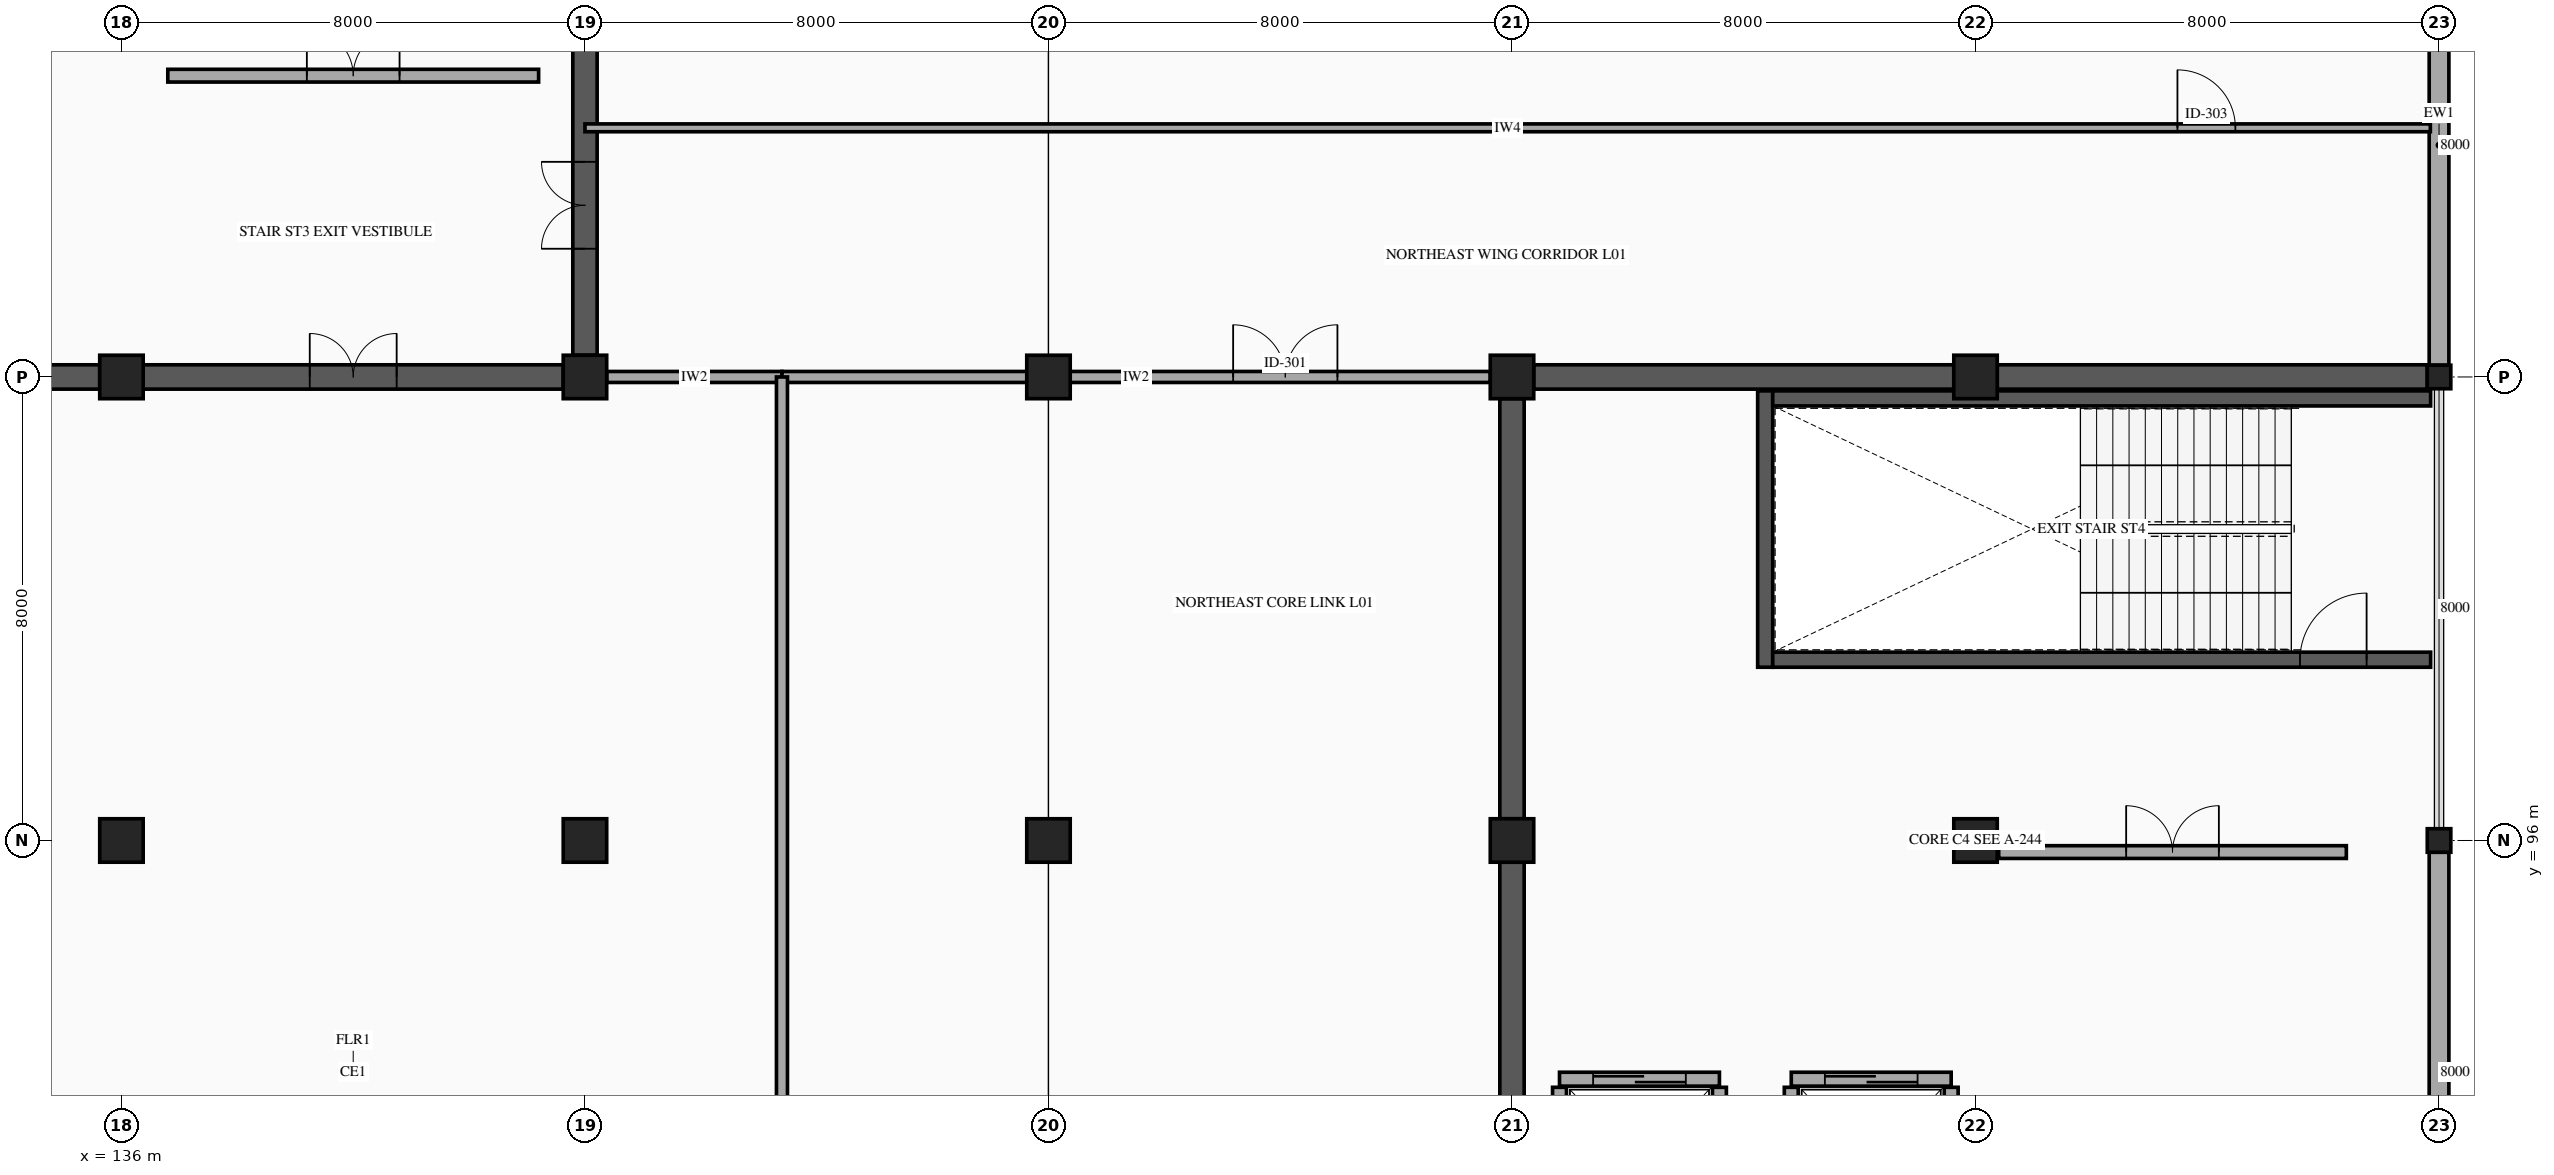
"""IFC4 building model, lengths in metres.
Left out: names, types, materials, properties, quantities, classifications, styles, units other than length and angle.
Written with IfcOpenShell. Run it as: python <this file> out.ifc"""

import sys

from ifc_helpers import new_model, si_unit, direction, frame, frame_2d, origin, origin_2d, place, context, subcontext, project, spatial, rectangle, hollow_rectangle, extrude, element, fill, save


model = new_model("IFC4")
c1 = context("Model", 3, precision=1e-05, world=origin(), true_north=direction((0.0, 1.0)))
c2 = subcontext(c1, "Body", "Model", "MODEL_VIEW")
j1 = project(units=[si_unit("LENGTHUNIT", "METRE"), si_unit("PLANEANGLEUNIT", "RADIAN")], contexts=[c1])
p1 = place(None, origin())
s1 = spatial("IfcSite", under=j1, at=p1, CompositionType="ELEMENT")
p2 = place(p1, origin())
s2 = spatial("IfcBuilding", under=s1, at=p2, CompositionType="ELEMENT")
p3 = place(p2, frame((0.0, 0.0, 5.6)))
s3 = spatial("IfcBuildingStorey", under=s2, at=p3, CompositionType="ELEMENT", Elevation=5.6)
for number, where, z_axis, x_axis in (
    (1, (136.0, 96.0, 0.0), (0.0, 0.0, 1.0), (1.0, 0.0, 0.0)),
    (2, (136.0, 104.0, 0.0), (0.0, 0.0, 1.0), (1.0, 0.0, 0.0)),
    (3, (144.0, 96.0, 0.0), (0.0, 0.0, 1.0), (1.0, 0.0, 0.0)),
    (4, (144.0, 104.0, 0.0), (0.0, 0.0, 1.0), (1.0, 0.0, 0.0)),
    (5, (152.0, 96.0, 0.0), (0.0, 0.0, 1.0), (1.0, 0.0, 0.0)),
    (6, (152.0, 104.0, 0.0), (0.0, 0.0, 1.0), (1.0, 0.0, 0.0)),
    (7, (160.0, 96.0, 0.0), (0.0, 0.0, 1.0), (1.0, 0.0, 0.0)),
    (8, (160.0, 104.0, 0.0), (0.0, 0.0, 1.0), (1.0, 0.0, 0.0)),
    (9, (168.0, 96.0, 0.0), (0.0, 0.0, 1.0), (1.0, 0.0, 0.0)),
    (10, (168.0, 104.0, 0.0), (0.0, 0.0, 1.0), (1.0, 0.0, 0.0)),
):
    element("IfcColumn", number, at=place(p3, frame(where, z_axis=z_axis, x_axis=x_axis)), inside=s3, PredefinedType="COLUMN", context=c2, shape_type="SweptSolid", body=[
        extrude(rectangle(XDim=0.75, YDim=0.75, at=origin_2d()), origin(), (0.0, 0.0, 1.0), 4.8),
    ])
for number, where, z_axis, x_axis in (
    (11, (176.0, 96.0, 0.0), (0.0, 0.0, 1.0), (1.0, 0.0, 0.0)),
    (12, (176.0, 104.0, 0.0), (0.0, 0.0, 1.0), (1.0, 0.0, 0.0)),
):
    element("IfcColumn", number, at=place(p3, frame(where, z_axis=z_axis, x_axis=x_axis)), inside=s3, PredefinedType="COLUMN", context=c2, shape_type="SweptSolid", body=[
        extrude(hollow_rectangle(XDim=0.406, YDim=0.406, WallThickness=0.015, InnerFilletRadius=0.015, OuterFilletRadius=0.029, at=origin_2d()), origin(), (0.0, 0.0, 1.0), 4.8),
    ])
for number, where, z_axis, x_axis in (
    (13, (176.0, 111.797, 0.0), (0.0, 0.0, 1.0), (0.0, -1.0, 0.0)),
    (14, (176.0, 95.797, 0.0), (0.0, 0.0, 1.0), (0.0, -1.0, 0.0)),
):
    element("IfcWall", number, at=place(p3, frame(where, z_axis=z_axis, x_axis=x_axis)), inside=s3, PredefinedType="STANDARD", context=c2, shape_type="SweptSolid", body=[
        extrude(rectangle(XDim=7.594, YDim=0.34, at=frame_2d((3.797, 0.0))), origin(), (0.0, 0.0, 1.0), 3.78),
    ])
p4 = place(p3, frame((128.375, 104.0, 0.0), z_axis=(0.0, 0.0, 1.0), x_axis=(1.0, 0.0, 0.0)))
e15 = element("IfcWall", 15, at=p4, inside=s3, PredefinedType="SHEAR", context=c2, shape_type="SweptSolid", body=[
    extrude(rectangle(XDim=7.25, YDim=0.42, at=frame_2d((3.625, 0.0))), origin(), (0.0, 0.0, 1.0), 4.58),
])
p5 = place(p3, frame((136.375, 104.0, 0.0), z_axis=(0.0, 0.0, 1.0), x_axis=(1.0, 0.0, 0.0)))
e16 = element("IfcWall", 16, at=p5, inside=s3, PredefinedType="SHEAR", context=c2, shape_type="SweptSolid", body=[
    extrude(rectangle(XDim=7.25, YDim=0.42, at=frame_2d((3.625, 0.0))), origin(), (0.0, 0.0, 1.0), 4.58),
])
p6 = place(p5, frame((2.875, 0.0, 0.0)))
e17 = element("IfcOpeningElement", 17, at=p6, cuts=e16, PredefinedType="OPENING", context=c2, shape_type="SweptSolid", body=[
    extrude(rectangle(XDim=1.5, YDim=2.15, at=frame_2d((0.75, 1.075))), frame((0.0, 0.22, 0.0), z_axis=(0.0, -1.0, 0.0), x_axis=(1.0, 0.0, 0.0)), (0.0, 0.0, 1.0), 0.44),
])
p7 = place(p3, frame((144.0, 104.375, 0.0), z_axis=(0.0, 0.0, 1.0), x_axis=(0.0, 1.0, 0.0)))
e18 = element("IfcWall", 18, at=p7, inside=s3, PredefinedType="SHEAR", context=c2, shape_type="SweptSolid", body=[
    extrude(rectangle(XDim=7.25, YDim=0.42, at=frame_2d((3.625, 0.0))), origin(), (0.0, 0.0, 1.0), 4.58),
])
p8 = place(p7, frame((1.838, 0.0, 0.0)))
e19 = element("IfcOpeningElement", 19, at=p8, cuts=e18, PredefinedType="OPENING", context=c2, shape_type="SweptSolid", body=[
    extrude(rectangle(XDim=1.5, YDim=2.15, at=frame_2d((0.75, 1.075))), frame((0.0, 0.22, 0.0), z_axis=(0.0, -1.0, 0.0), x_axis=(1.0, 0.0, 0.0)), (0.0, 0.0, 1.0), 0.44),
])
p9 = place(p3, frame((136.8, 109.2, 0.0), z_axis=(0.0, 0.0, 1.0), x_axis=(1.0, 0.0, 0.0)))
e20 = element("IfcWall", 20, at=p9, inside=s3, PredefinedType="PARTITIONING", context=c2, shape_type="SweptSolid", body=[
    extrude(rectangle(XDim=6.4, YDim=0.22, at=frame_2d((3.2, 0.0))), origin(), (0.0, 0.0, 1.0), 3.78),
])
p10 = place(p9, frame((2.4, 0.0, 0.0)))
e21 = element("IfcOpeningElement", 21, at=p10, cuts=e20, PredefinedType="OPENING", context=c2, shape_type="SweptSolid", body=[
    extrude(rectangle(XDim=1.6, YDim=2.15, at=frame_2d((0.8, 1.075))), frame((0.0, 0.12, 0.0), z_axis=(0.0, -1.0, 0.0), x_axis=(1.0, 0.0, 0.0)), (0.0, 0.0, 1.0), 0.24),
])
p11 = place(p3, frame((164.37, 98.99, 0.0), z_axis=(0.0, 0.0, 1.0), x_axis=(0.0, 1.0, 0.0)))
e22 = element("IfcWall", 22, at=p11, inside=s3, PredefinedType="SHEAR", context=c2, shape_type="SweptSolid", body=[
    extrude(rectangle(XDim=4.77, YDim=0.26, at=frame_2d((2.385, 0.0))), origin(), (0.0, 0.0, 1.0), 4.58),
])
p12 = place(p3, frame((164.5, 99.12, 0.0), z_axis=(0.0, 0.0, 1.0), x_axis=(1.0, 0.0, 0.0)))
e23 = element("IfcWall", 23, at=p12, inside=s3, PredefinedType="SHEAR", context=c2, shape_type="SweptSolid", body=[
    extrude(rectangle(XDim=11.355, YDim=0.26, at=frame_2d((5.677, 0.0))), origin(), (0.0, 0.0, 1.0), 4.58),
])
p13 = place(p12, frame((9.1, 0.0, 0.0)))
e24 = element("IfcOpeningElement", 24, at=p13, cuts=e23, PredefinedType="OPENING", context=c2, shape_type="SweptSolid", body=[
    extrude(rectangle(XDim=1.15, YDim=2.15, at=frame_2d((0.575, 1.075))), frame((0.0, 0.14, 0.0), z_axis=(0.0, -1.0, 0.0), x_axis=(1.0, 0.0, 0.0)), (0.0, 0.0, 1.0), 0.28),
])
p14 = place(p3, frame((164.5, 103.63, 0.0), z_axis=(0.0, 0.0, 1.0), x_axis=(1.0, 0.0, 0.0)))
e25 = element("IfcWall", 25, at=p14, inside=s3, PredefinedType="SHEAR", context=c2, shape_type="SweptSolid", body=[
    extrude(rectangle(XDim=11.355, YDim=0.26, at=frame_2d((5.677, 0.0))), origin(), (0.0, 0.0, 1.0), 4.58),
])
p15 = place(p3, frame((160.375, 104.0, 0.0), z_axis=(0.0, 0.0, 1.0), x_axis=(1.0, 0.0, 0.0)))
e26 = element("IfcWall", 26, at=p15, inside=s3, PredefinedType="SHEAR", context=c2, shape_type="SweptSolid", body=[
    extrude(rectangle(XDim=7.25, YDim=0.42, at=frame_2d((3.625, 0.0))), origin(), (0.0, 0.0, 1.0), 4.58),
])
p16 = place(p3, frame((168.375, 104.0, 0.0), z_axis=(0.0, 0.0, 1.0), x_axis=(1.0, 0.0, 0.0)))
e27 = element("IfcWall", 27, at=p16, inside=s3, PredefinedType="SHEAR", context=c2, shape_type="SweptSolid", body=[
    extrude(rectangle(XDim=7.422, YDim=0.42, at=frame_2d((3.711, 0.0))), origin(), (0.0, 0.0, 1.0), 4.58),
])
for number, where, z_axis, x_axis in (
    (28, (160.0, 88.375, 0.0), (0.0, 0.0, 1.0), (0.0, 1.0, 0.0)),
    (29, (160.0, 96.375, 0.0), (0.0, 0.0, 1.0), (0.0, 1.0, 0.0)),
):
    element("IfcWall", number, at=place(p3, frame(where, z_axis=z_axis, x_axis=x_axis)), inside=s3, PredefinedType="SHEAR", context=c2, shape_type="SweptSolid", body=[
        extrude(rectangle(XDim=7.25, YDim=0.42, at=frame_2d((3.625, 0.0))), origin(), (0.0, 0.0, 1.0), 4.58),
    ])
p17 = place(p3, frame((164.82, 91.88, 0.0), z_axis=(0.0, 0.0, 1.0), x_axis=(1.0, 0.0, 0.0)))
e30 = element("IfcWall", 30, at=p17, inside=s3, PredefinedType="PARTITIONING", context=c2, shape_type="SweptSolid", body=[
    extrude(rectangle(XDim=2.76, YDim=0.24, at=frame_2d((1.38, 0.0))), origin(), (0.0, 0.0, 1.0), 4.58),
])
p18 = place(p17, frame((0.58, 0.0, 0.0)))
e31 = element("IfcOpeningElement", 31, at=p18, cuts=e30, PredefinedType="OPENING", context=c2, shape_type="SweptSolid", body=[
    extrude(rectangle(XDim=1.6, YDim=2.3, at=frame_2d((0.8, 1.15))), frame((0.0, 0.13, 0.0), z_axis=(0.0, -1.0, 0.0), x_axis=(1.0, 0.0, 0.0)), (0.0, 0.0, 1.0), 0.26),
])
for number, where, z_axis, x_axis in (
    (32, (164.82, 89.06, 0.0), (0.0, 0.0, 1.0), (0.0, 1.0, 0.0)),
    (33, (167.58, 89.06, 0.0), (0.0, 0.0, 1.0), (0.0, 1.0, 0.0)),
):
    element("IfcWall", number, at=place(p3, frame(where, z_axis=z_axis, x_axis=x_axis)), inside=s3, PredefinedType="PARTITIONING", context=c2, shape_type="SweptSolid", body=[
        extrude(rectangle(XDim=2.68, YDim=0.24, at=frame_2d((1.34, 0.0))), origin(), (0.0, 0.0, 1.0), 4.58),
    ])
p19 = place(p3, frame((160.82, 91.88, 0.0), z_axis=(0.0, 0.0, 1.0), x_axis=(1.0, 0.0, 0.0)))
e34 = element("IfcWall", 34, at=p19, inside=s3, PredefinedType="PARTITIONING", context=c2, shape_type="SweptSolid", body=[
    extrude(rectangle(XDim=2.76, YDim=0.24, at=frame_2d((1.38, 0.0))), origin(), (0.0, 0.0, 1.0), 4.58),
])
p20 = place(p19, frame((0.58, 0.0, 0.0)))
e35 = element("IfcOpeningElement", 35, at=p20, cuts=e34, PredefinedType="OPENING", context=c2, shape_type="SweptSolid", body=[
    extrude(rectangle(XDim=1.6, YDim=2.3, at=frame_2d((0.8, 1.15))), frame((0.0, 0.13, 0.0), z_axis=(0.0, -1.0, 0.0), x_axis=(1.0, 0.0, 0.0)), (0.0, 0.0, 1.0), 0.26),
])
for number, where, z_axis, x_axis in (
    (36, (160.82, 89.06, 0.0), (0.0, 0.0, 1.0), (0.0, 1.0, 0.0)),
    (37, (163.58, 89.06, 0.0), (0.0, 0.0, 1.0), (0.0, 1.0, 0.0)),
):
    element("IfcWall", number, at=place(p3, frame(where, z_axis=z_axis, x_axis=x_axis)), inside=s3, PredefinedType="PARTITIONING", context=c2, shape_type="SweptSolid", body=[
        extrude(rectangle(XDim=2.68, YDim=0.24, at=frame_2d((1.34, 0.0))), origin(), (0.0, 0.0, 1.0), 4.58),
    ])
p21 = place(p3, frame((168.4, 95.8, 0.0), z_axis=(0.0, 0.0, 1.0), x_axis=(1.0, 0.0, 0.0)))
e38 = element("IfcWall", 38, at=p21, inside=s3, PredefinedType="PARTITIONING", context=c2, shape_type="SweptSolid", body=[
    extrude(rectangle(XDim=6.0, YDim=0.22, at=frame_2d((3.0, 0.0))), origin(), (0.0, 0.0, 1.0), 3.78),
])
p22 = place(p21, frame((2.2, 0.0, 0.0)))
e39 = element("IfcOpeningElement", 39, at=p22, cuts=e38, PredefinedType="OPENING", context=c2, shape_type="SweptSolid", body=[
    extrude(rectangle(XDim=1.6, YDim=2.15, at=frame_2d((0.8, 1.075))), frame((0.0, 0.12, 0.0), z_axis=(0.0, -1.0, 0.0), x_axis=(1.0, 0.0, 0.0)), (0.0, 0.0, 1.0), 0.24),
])
p23 = place(p3, frame((144.375, 104.0, 0.0), z_axis=(0.0, 0.0, 1.0), x_axis=(1.0, 0.0, 0.0)))
e40 = element("IfcWall", 40, at=p23, inside=s3, PredefinedType="PARTITIONING", context=c2, shape_type="SweptSolid", body=[
    extrude(rectangle(XDim=3.025, YDim=0.19, at=frame_2d((1.512, 0.0))), origin(), (0.0, 0.0, 1.0), 3.78),
])
p24 = place(p3, frame((147.4, 104.0, 0.0), z_axis=(0.0, 0.0, 1.0), x_axis=(1.0, 0.0, 0.0)))
e41 = element("IfcWall", 41, at=p24, inside=s3, PredefinedType="PARTITIONING", context=c2, shape_type="SweptSolid", body=[
    extrude(rectangle(XDim=12.225, YDim=0.19, at=frame_2d((6.113, 0.0))), origin(), (0.0, 0.0, 1.0), 3.78),
])
p25 = place(p24, frame((7.787, 0.0, 0.0)))
e42 = element("IfcOpeningElement", 42, at=p25, cuts=e41, PredefinedType="OPENING", context=c2, shape_type="SweptSolid", body=[
    extrude(rectangle(XDim=1.8, YDim=2.25, at=frame_2d((0.9, 1.125))), frame((0.0, 0.105, 0.0), z_axis=(0.0, -1.0, 0.0), x_axis=(1.0, 0.0, 0.0)), (0.0, 0.0, 1.0), 0.21),
])
p26 = place(p3, frame((147.4, 72.15, 0.0), z_axis=(0.0, 0.0, 1.0), x_axis=(0.0, 1.0, 0.0)))
e43 = element("IfcWall", 43, at=p26, inside=s3, PredefinedType="PARTITIONING", context=c2, shape_type="SweptSolid", body=[
    extrude(rectangle(XDim=31.85, YDim=0.19, at=frame_2d((15.925, 0.0))), origin(), (0.0, 0.0, 1.0), 3.78),
])
p27 = place(p26, frame((2.959, 0.0, 0.0)))
e44 = element("IfcOpeningElement", 44, at=p27, cuts=e43, PredefinedType="OPENING", context=c2, shape_type="SweptSolid", body=[
    extrude(rectangle(XDim=1.8, YDim=2.25, at=frame_2d((0.9, 1.125))), frame((0.0, 0.105, 0.0), z_axis=(0.0, -1.0, 0.0), x_axis=(1.0, 0.0, 0.0)), (0.0, 0.0, 1.0), 0.21),
])
p28 = place(p3, frame((144.0, 108.3, 0.0), z_axis=(0.0, 0.0, 1.0), x_axis=(1.0, 0.0, 0.0)))
e45 = element("IfcWall", 45, at=p28, inside=s3, PredefinedType="PARTITIONING", context=c2, shape_type="SweptSolid", body=[
    extrude(rectangle(XDim=31.85, YDim=0.135, at=frame_2d((15.925, 0.0))), origin(), (0.0, 0.0, 1.0), 3.78),
])
p29 = place(p28, frame((27.485, 0.0, 0.0)))
e46 = element("IfcOpeningElement", 46, at=p29, cuts=e45, PredefinedType="OPENING", context=c2, shape_type="SweptSolid", body=[
    extrude(rectangle(XDim=1.0, YDim=2.15, at=frame_2d((0.5, 1.075))), frame((0.0, 0.077, 0.0), z_axis=(0.0, -1.0, 0.0), x_axis=(1.0, 0.0, 0.0)), (0.0, 0.0, 1.0), 0.155),
])
p30 = place(p6, origin())
e47 = element("IfcDoor", 47, at=p30, inside=s3, OperationType="DOUBLE_DOOR_SINGLE_SWING", PredefinedType="DOOR", context=c2, shape_type="SweptSolid", body=[
    extrude(rectangle(XDim=1.5, YDim=2.15, at=frame_2d((0.75, 1.075))), frame((0.0, 0.025, 0.0), z_axis=(0.0, -1.0, 0.0), x_axis=(1.0, 0.0, 0.0)), (0.0, 0.0, 1.0), 0.05),
])
fill(e17, e47)
p31 = place(p8, origin())
e48 = element("IfcDoor", 48, at=p31, inside=s3, OperationType="DOUBLE_DOOR_SINGLE_SWING", PredefinedType="DOOR", context=c2, shape_type="SweptSolid", body=[
    extrude(rectangle(XDim=1.5, YDim=2.15, at=frame_2d((0.75, 1.075))), frame((0.0, 0.025, 0.0), z_axis=(0.0, -1.0, 0.0), x_axis=(1.0, 0.0, 0.0)), (0.0, 0.0, 1.0), 0.05),
])
fill(e19, e48)
p32 = place(p10, origin())
e49 = element("IfcDoor", 49, at=p32, inside=s3, OperationType="DOUBLE_DOOR_SINGLE_SWING", PredefinedType="DOOR", context=c2, shape_type="SweptSolid", body=[
    extrude(rectangle(XDim=1.6, YDim=2.15, at=frame_2d((0.8, 1.075))), frame((0.0, 0.025, 0.0), z_axis=(0.0, -1.0, 0.0), x_axis=(1.0, 0.0, 0.0)), (0.0, 0.0, 1.0), 0.05),
])
fill(e21, e49)
p33 = place(p13, origin())
e50 = element("IfcDoor", 50, at=p33, inside=s3, OperationType="SINGLE_SWING_RIGHT", PredefinedType="DOOR", context=c2, shape_type="SweptSolid", body=[
    extrude(rectangle(XDim=1.15, YDim=2.15, at=frame_2d((0.575, 1.075))), frame((0.0, 0.025, 0.0), z_axis=(0.0, -1.0, 0.0), x_axis=(1.0, 0.0, 0.0)), (0.0, 0.0, 1.0), 0.05),
])
fill(e24, e50)
p34 = place(p18, origin())
e51 = element("IfcDoor", 51, at=p34, inside=s3, OperationType="SLIDING_TO_LEFT", PredefinedType="DOOR", context=c2, shape_type="SweptSolid", body=[
    extrude(rectangle(XDim=1.6, YDim=2.3, at=frame_2d((0.8, 1.15))), frame((0.0, 0.025, 0.0), z_axis=(0.0, -1.0, 0.0), x_axis=(1.0, 0.0, 0.0)), (0.0, 0.0, 1.0), 0.05),
])
fill(e31, e51)
p35 = place(p20, origin())
e52 = element("IfcDoor", 52, at=p35, inside=s3, OperationType="SLIDING_TO_LEFT", PredefinedType="DOOR", context=c2, shape_type="SweptSolid", body=[
    extrude(rectangle(XDim=1.6, YDim=2.3, at=frame_2d((0.8, 1.15))), frame((0.0, 0.025, 0.0), z_axis=(0.0, -1.0, 0.0), x_axis=(1.0, 0.0, 0.0)), (0.0, 0.0, 1.0), 0.05),
])
fill(e35, e52)
p36 = place(p22, origin())
e53 = element("IfcDoor", 53, at=p36, inside=s3, OperationType="DOUBLE_DOOR_SINGLE_SWING", PredefinedType="DOOR", context=c2, shape_type="SweptSolid", body=[
    extrude(rectangle(XDim=1.6, YDim=2.15, at=frame_2d((0.8, 1.075))), frame((0.0, 0.025, 0.0), z_axis=(0.0, -1.0, 0.0), x_axis=(1.0, 0.0, 0.0)), (0.0, 0.0, 1.0), 0.05),
])
fill(e39, e53)
p37 = place(p25, origin())
e54 = element("IfcDoor", 54, at=p37, inside=s3, OperationType="DOUBLE_DOOR_SINGLE_SWING", PredefinedType="DOOR", context=c2, shape_type="SweptSolid", body=[
    extrude(rectangle(XDim=1.8, YDim=2.25, at=frame_2d((0.9, 1.125))), frame((0.0, 0.025, 0.0), z_axis=(0.0, -1.0, 0.0), x_axis=(1.0, 0.0, 0.0)), (0.0, 0.0, 1.0), 0.05),
])
fill(e42, e54)
p38 = place(p29, origin())
e55 = element("IfcDoor", 55, at=p38, inside=s3, OperationType="SINGLE_SWING_LEFT", PredefinedType="DOOR", context=c2, shape_type="SweptSolid", body=[
    extrude(rectangle(XDim=1.0, YDim=2.15, at=frame_2d((0.5, 1.075))), frame((0.0, 0.025, 0.0), z_axis=(0.0, -1.0, 0.0), x_axis=(1.0, 0.0, 0.0)), (0.0, 0.0, 1.0), 0.05),
])
fill(e46, e55)
save(model, sys.argv[1])
